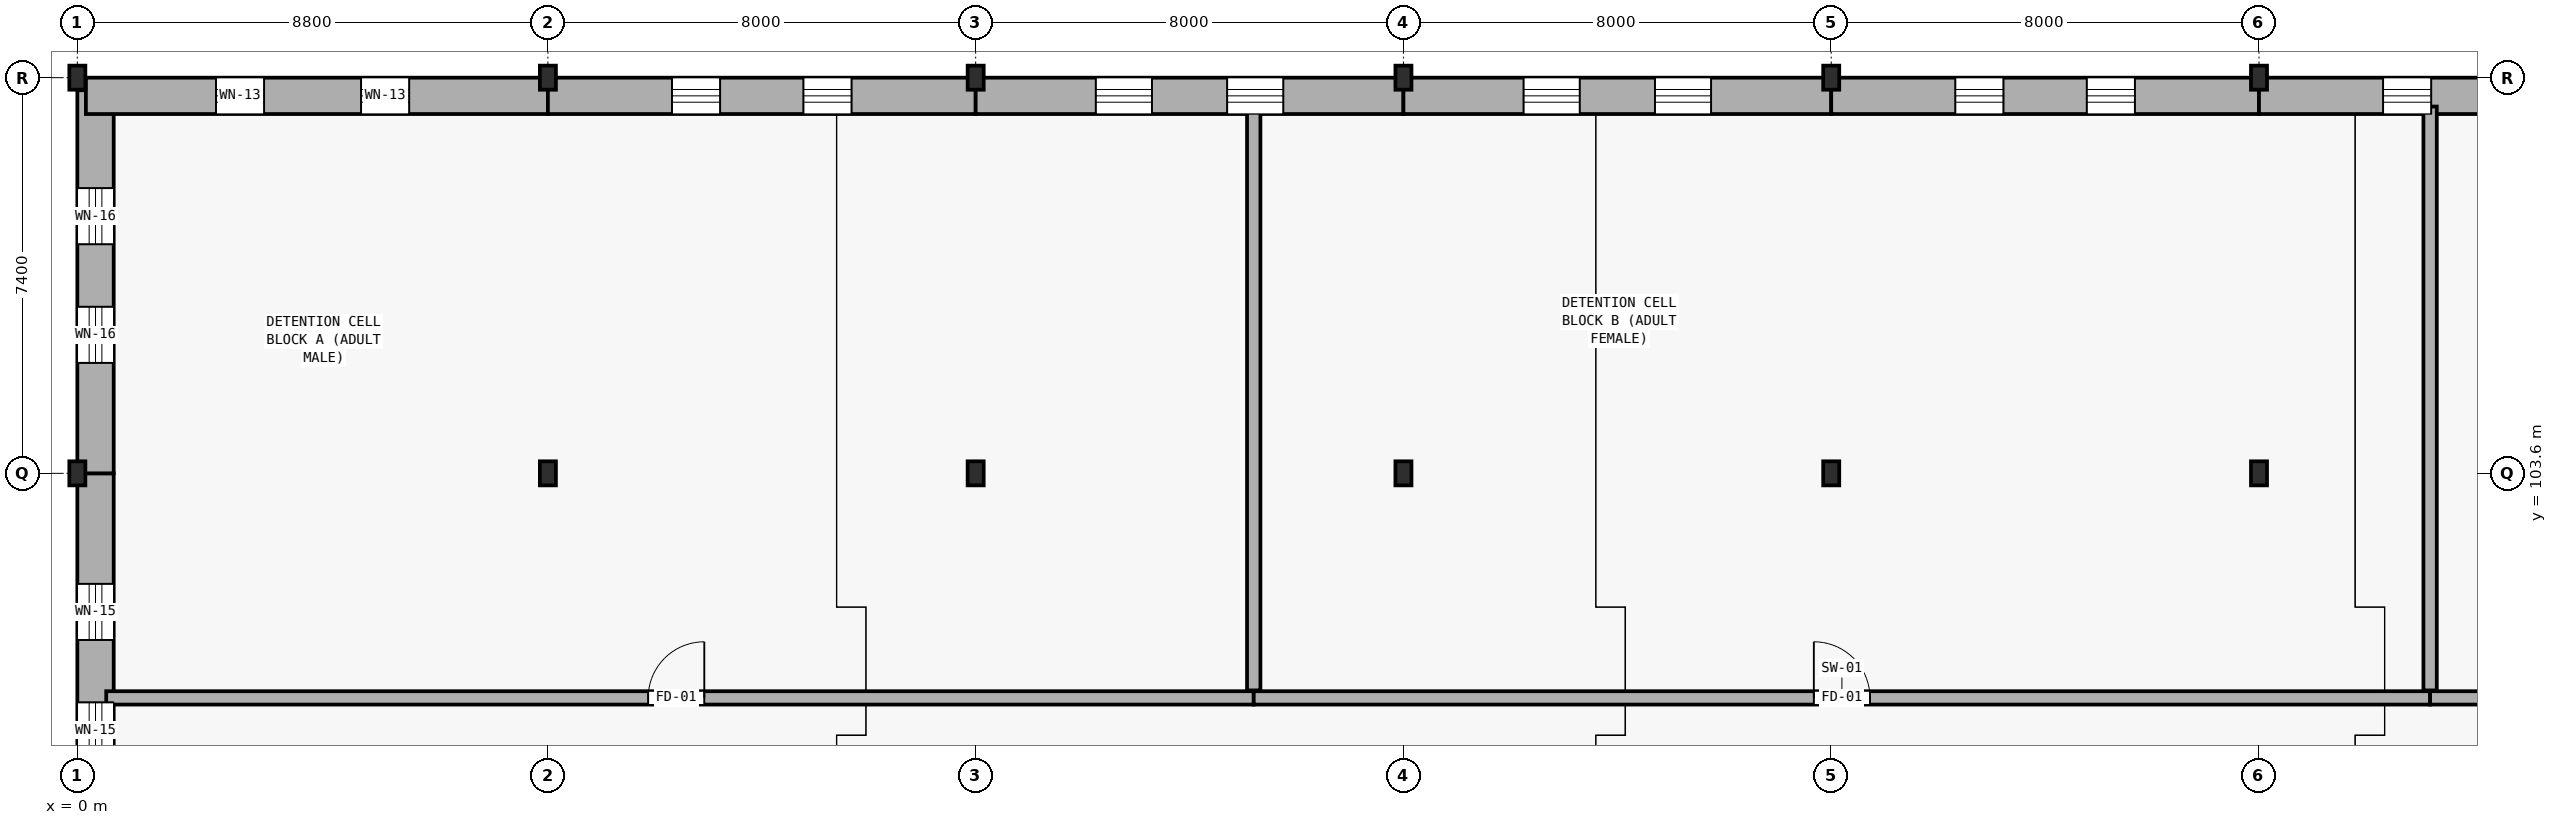
"""IFC4 building model, lengths in metres.
Left out: names, types, materials, properties, quantities, classifications, styles, units other than length and angle.
Written with IfcOpenShell. Run it as: python <this file> out.ifc"""

import sys

from ifc_helpers import new_model, si_unit, direction, frame, frame_2d, origin, origin_2d, place, context, subcontext, project, spatial, rectangle, i_section, extrude, element, fill, save


model = new_model("IFC4")
c1 = context("Model", 3, precision=1e-05, world=origin(), true_north=direction((0.0, 1.0)))
c2 = subcontext(c1, "Body", "Model", "MODEL_VIEW")
j1 = project(units=[si_unit("LENGTHUNIT", "METRE"), si_unit("PLANEANGLEUNIT", "RADIAN")], contexts=[c1])
p1 = place(None, origin())
s1 = spatial("IfcSite", under=j1, at=p1, CompositionType="ELEMENT")
p2 = place(p1, origin())
s2 = spatial("IfcBuilding", under=s1, at=p2, CompositionType="ELEMENT")
p3 = place(p2, frame((0.0, 0.0, 5.4)))
s3 = spatial("IfcBuildingStorey", under=s2, at=p3, CompositionType="ELEMENT", Elevation=5.4)
for number, where, z_axis, x_axis in (
    (1, (0.0, 103.6, 0.0), (0.0, 0.0, 1.0), (1.0, 0.0, 0.0)),
    (2, (0.0, 111.0, 0.0), (0.0, 0.0, 1.0), (1.0, 0.0, 0.0)),
    (3, (8.8, 103.6, 0.0), (0.0, 0.0, 1.0), (1.0, 0.0, 0.0)),
    (4, (8.8, 111.0, 0.0), (0.0, 0.0, 1.0), (1.0, 0.0, 0.0)),
    (5, (16.8, 103.6, 0.0), (0.0, 0.0, 1.0), (1.0, 0.0, 0.0)),
    (6, (16.8, 111.0, 0.0), (0.0, 0.0, 1.0), (1.0, 0.0, 0.0)),
    (7, (24.8, 103.6, 0.0), (0.0, 0.0, 1.0), (1.0, 0.0, 0.0)),
    (8, (24.8, 111.0, 0.0), (0.0, 0.0, 1.0), (1.0, 0.0, 0.0)),
    (9, (32.8, 103.6, 0.0), (0.0, 0.0, 1.0), (1.0, 0.0, 0.0)),
    (10, (32.8, 111.0, 0.0), (0.0, 0.0, 1.0), (1.0, 0.0, 0.0)),
    (11, (40.8, 103.6, 0.0), (0.0, 0.0, 1.0), (1.0, 0.0, 0.0)),
    (12, (40.8, 111.0, 0.0), (0.0, 0.0, 1.0), (1.0, 0.0, 0.0)),
):
    element("IfcColumn", number, at=place(p3, frame(where, z_axis=z_axis, x_axis=x_axis)), inside=s3, PredefinedType="COLUMN", context=c2, shape_type="SweptSolid", body=[
        extrude(i_section(OverallWidth=0.3, OverallDepth=0.45, WebThickness=0.014, FlangeThickness=0.026, FilletRadius=0.027, at=origin_2d()), origin(), (0.0, 0.0, 1.0), 4.5),
    ])
p4 = place(p3, frame((0.34, 96.2, 0.0), z_axis=(0.0, 0.0, 1.0), x_axis=(0.0, 1.0, 0.0)))
e13 = element("IfcWall", 13, at=p4, inside=s3, PredefinedType="SOLIDWALL", context=c2, shape_type="SweptSolid", body=[
    extrude(rectangle(XDim=7.4, YDim=0.68, at=frame_2d((3.7, 0.0))), origin(), (0.0, 0.0, 1.0), 4.22),
])
p5 = place(p4, frame((2.066, 0.0, 1.8)))
e14 = element("IfcOpeningElement", 14, at=p5, cuts=e13, PredefinedType="OPENING", context=c2, shape_type="SweptSolid", body=[
    extrude(rectangle(XDim=1.05, YDim=0.95, at=frame_2d((0.525, 0.475))), frame((0.0, 0.35, 0.0), z_axis=(0.0, -1.0, 0.0), x_axis=(1.0, 0.0, 0.0)), (0.0, 0.0, 1.0), 0.7),
])
p6 = place(p4, frame((4.284, 0.0, 1.8)))
e15 = element("IfcOpeningElement", 15, at=p6, cuts=e13, PredefinedType="OPENING", context=c2, shape_type="SweptSolid", body=[
    extrude(rectangle(XDim=1.05, YDim=0.95, at=frame_2d((0.525, 0.475))), frame((0.0, 0.35, 0.0), z_axis=(0.0, -1.0, 0.0), x_axis=(1.0, 0.0, 0.0)), (0.0, 0.0, 1.0), 0.7),
])
p7 = place(p3, frame((0.34, 103.6, 0.0), z_axis=(0.0, 0.0, 1.0), x_axis=(0.0, 1.0, 0.0)))
e16 = element("IfcWall", 16, at=p7, inside=s3, PredefinedType="SOLIDWALL", context=c2, shape_type="SweptSolid", body=[
    extrude(rectangle(XDim=7.165, YDim=0.68, at=frame_2d((3.583, 0.0))), origin(), (0.0, 0.0, 1.0), 4.22),
])
p8 = place(p7, frame((2.066, 0.0, 1.8)))
e17 = element("IfcOpeningElement", 17, at=p8, cuts=e16, PredefinedType="OPENING", context=c2, shape_type="SweptSolid", body=[
    extrude(rectangle(XDim=1.05, YDim=1.2, at=frame_2d((0.525, 0.6))), frame((0.0, 0.35, 0.0), z_axis=(0.0, -1.0, 0.0), x_axis=(1.0, 0.0, 0.0)), (0.0, 0.0, 1.0), 0.7),
])
p9 = place(p7, frame((4.284, 0.0, 1.8)))
e18 = element("IfcOpeningElement", 18, at=p9, cuts=e16, PredefinedType="OPENING", context=c2, shape_type="SweptSolid", body=[
    extrude(rectangle(XDim=1.05, YDim=1.2, at=frame_2d((0.525, 0.6))), frame((0.0, 0.35, 0.0), z_axis=(0.0, -1.0, 0.0), x_axis=(1.0, 0.0, 0.0)), (0.0, 0.0, 1.0), 0.7),
])
p10 = place(p3, frame((0.16, 110.66, 0.0), z_axis=(0.0, 0.0, 1.0), x_axis=(1.0, 0.0, 0.0)))
e19 = element("IfcWall", 19, at=p10, inside=s3, PredefinedType="SOLIDWALL", context=c2, shape_type="SweptSolid", body=[
    extrude(rectangle(XDim=8.64, YDim=0.68, at=frame_2d((4.32, 0.0))), origin(), (0.0, 0.0, 1.0), 4.22),
])
p11 = place(p10, frame((2.433, 0.0, 1.8)))
e20 = element("IfcOpeningElement", 20, at=p11, cuts=e19, PredefinedType="OPENING", context=c2, shape_type="SweptSolid", body=[
    extrude(rectangle(XDim=0.9, YDim=0.9, at=frame_2d((0.45, 0.45))), frame((0.0, 0.35, 0.0), z_axis=(0.0, -1.0, 0.0), x_axis=(1.0, 0.0, 0.0)), (0.0, 0.0, 1.0), 0.7),
])
p12 = place(p10, frame((5.147, 0.0, 1.8)))
e21 = element("IfcOpeningElement", 21, at=p12, cuts=e19, PredefinedType="OPENING", context=c2, shape_type="SweptSolid", body=[
    extrude(rectangle(XDim=0.9, YDim=0.9, at=frame_2d((0.45, 0.45))), frame((0.0, 0.35, 0.0), z_axis=(0.0, -1.0, 0.0), x_axis=(1.0, 0.0, 0.0)), (0.0, 0.0, 1.0), 0.7),
])
p13 = place(p3, frame((8.8, 110.66, 0.0), z_axis=(0.0, 0.0, 1.0), x_axis=(1.0, 0.0, 0.0)))
e22 = element("IfcWall", 22, at=p13, inside=s3, PredefinedType="SOLIDWALL", context=c2, shape_type="SweptSolid", body=[
    extrude(rectangle(XDim=8.0, YDim=0.68, at=frame_2d((4.0, 0.0))), origin(), (0.0, 0.0, 1.0), 4.22),
])
p14 = place(p13, frame((2.321, 0.0, 1.8)))
e23 = element("IfcOpeningElement", 23, at=p14, cuts=e22, PredefinedType="OPENING", context=c2, shape_type="SweptSolid", body=[
    extrude(rectangle(XDim=0.9, YDim=1.15, at=frame_2d((0.45, 0.575))), frame((0.0, 0.35, 0.0), z_axis=(0.0, -1.0, 0.0), x_axis=(1.0, 0.0, 0.0)), (0.0, 0.0, 1.0), 0.7),
])
p15 = place(p13, frame((4.779, 0.0, 1.8)))
e24 = element("IfcOpeningElement", 24, at=p15, cuts=e22, PredefinedType="OPENING", context=c2, shape_type="SweptSolid", body=[
    extrude(rectangle(XDim=0.9, YDim=1.15, at=frame_2d((0.45, 0.575))), frame((0.0, 0.35, 0.0), z_axis=(0.0, -1.0, 0.0), x_axis=(1.0, 0.0, 0.0)), (0.0, 0.0, 1.0), 0.7),
])
p16 = place(p3, frame((16.8, 110.66, 0.0), z_axis=(0.0, 0.0, 1.0), x_axis=(1.0, 0.0, 0.0)))
e25 = element("IfcWall", 25, at=p16, inside=s3, PredefinedType="SOLIDWALL", context=c2, shape_type="SweptSolid", body=[
    extrude(rectangle(XDim=8.0, YDim=0.68, at=frame_2d((4.0, 0.0))), origin(), (0.0, 0.0, 1.0), 4.22),
])
p17 = place(p16, frame((2.246, 0.0, 1.8)))
e26 = element("IfcOpeningElement", 26, at=p17, cuts=e25, PredefinedType="OPENING", context=c2, shape_type="SweptSolid", body=[
    extrude(rectangle(XDim=1.05, YDim=0.95, at=frame_2d((0.525, 0.475))), frame((0.0, 0.35, 0.0), z_axis=(0.0, -1.0, 0.0), x_axis=(1.0, 0.0, 0.0)), (0.0, 0.0, 1.0), 0.7),
])
p18 = place(p16, frame((4.704, 0.0, 1.8)))
e27 = element("IfcOpeningElement", 27, at=p18, cuts=e25, PredefinedType="OPENING", context=c2, shape_type="SweptSolid", body=[
    extrude(rectangle(XDim=1.05, YDim=0.95, at=frame_2d((0.525, 0.475))), frame((0.0, 0.35, 0.0), z_axis=(0.0, -1.0, 0.0), x_axis=(1.0, 0.0, 0.0)), (0.0, 0.0, 1.0), 0.7),
])
p19 = place(p3, frame((24.8, 110.66, 0.0), z_axis=(0.0, 0.0, 1.0), x_axis=(1.0, 0.0, 0.0)))
e28 = element("IfcWall", 28, at=p19, inside=s3, PredefinedType="SOLIDWALL", context=c2, shape_type="SweptSolid", body=[
    extrude(rectangle(XDim=8.0, YDim=0.68, at=frame_2d((4.0, 0.0))), origin(), (0.0, 0.0, 1.0), 4.22),
])
p20 = place(p19, frame((2.246, 0.0, 1.8)))
e29 = element("IfcOpeningElement", 29, at=p20, cuts=e28, PredefinedType="OPENING", context=c2, shape_type="SweptSolid", body=[
    extrude(rectangle(XDim=1.05, YDim=1.2, at=frame_2d((0.525, 0.6))), frame((0.0, 0.35, 0.0), z_axis=(0.0, -1.0, 0.0), x_axis=(1.0, 0.0, 0.0)), (0.0, 0.0, 1.0), 0.7),
])
p21 = place(p19, frame((4.704, 0.0, 1.8)))
e30 = element("IfcOpeningElement", 30, at=p21, cuts=e28, PredefinedType="OPENING", context=c2, shape_type="SweptSolid", body=[
    extrude(rectangle(XDim=1.05, YDim=1.2, at=frame_2d((0.525, 0.6))), frame((0.0, 0.35, 0.0), z_axis=(0.0, -1.0, 0.0), x_axis=(1.0, 0.0, 0.0)), (0.0, 0.0, 1.0), 0.7),
])
p22 = place(p3, frame((32.8, 110.66, 0.0), z_axis=(0.0, 0.0, 1.0), x_axis=(1.0, 0.0, 0.0)))
e31 = element("IfcWall", 31, at=p22, inside=s3, PredefinedType="SOLIDWALL", context=c2, shape_type="SweptSolid", body=[
    extrude(rectangle(XDim=8.0, YDim=0.68, at=frame_2d((4.0, 0.0))), origin(), (0.0, 0.0, 1.0), 4.22),
])
p23 = place(p22, frame((2.321, 0.0, 1.8)))
e32 = element("IfcOpeningElement", 32, at=p23, cuts=e31, PredefinedType="OPENING", context=c2, shape_type="SweptSolid", body=[
    extrude(rectangle(XDim=0.9, YDim=0.9, at=frame_2d((0.45, 0.45))), frame((0.0, 0.35, 0.0), z_axis=(0.0, -1.0, 0.0), x_axis=(1.0, 0.0, 0.0)), (0.0, 0.0, 1.0), 0.7),
])
p24 = place(p22, frame((4.779, 0.0, 1.8)))
e33 = element("IfcOpeningElement", 33, at=p24, cuts=e31, PredefinedType="OPENING", context=c2, shape_type="SweptSolid", body=[
    extrude(rectangle(XDim=0.9, YDim=0.9, at=frame_2d((0.45, 0.45))), frame((0.0, 0.35, 0.0), z_axis=(0.0, -1.0, 0.0), x_axis=(1.0, 0.0, 0.0)), (0.0, 0.0, 1.0), 0.7),
])
p25 = place(p3, frame((40.8, 110.66, 0.0), z_axis=(0.0, 0.0, 1.0), x_axis=(1.0, 0.0, 0.0)))
e34 = element("IfcWall", 34, at=p25, inside=s3, PredefinedType="SOLIDWALL", context=c2, shape_type="SweptSolid", body=[
    extrude(rectangle(XDim=8.0, YDim=0.68, at=frame_2d((4.0, 0.0))), origin(), (0.0, 0.0, 1.0), 4.22),
])
p26 = place(p25, frame((2.321, 0.0, 1.8)))
e35 = element("IfcOpeningElement", 35, at=p26, cuts=e34, PredefinedType="OPENING", context=c2, shape_type="SweptSolid", body=[
    extrude(rectangle(XDim=0.9, YDim=1.15, at=frame_2d((0.45, 0.575))), frame((0.0, 0.35, 0.0), z_axis=(0.0, -1.0, 0.0), x_axis=(1.0, 0.0, 0.0)), (0.0, 0.0, 1.0), 0.7),
])
p27 = place(p25, frame((4.779, 0.0, 1.8)))
e36 = element("IfcOpeningElement", 36, at=p27, cuts=e34, PredefinedType="OPENING", context=c2, shape_type="SweptSolid", body=[
    extrude(rectangle(XDim=0.9, YDim=1.15, at=frame_2d((0.45, 0.575))), frame((0.0, 0.35, 0.0), z_axis=(0.0, -1.0, 0.0), x_axis=(1.0, 0.0, 0.0)), (0.0, 0.0, 1.0), 0.7),
])
p28 = place(p3, frame((0.54, 99.4, 0.0), z_axis=(0.0, 0.0, 1.0), x_axis=(1.0, 0.0, 0.0)))
e37 = element("IfcWall", 37, at=p28, inside=s3, PredefinedType="SOLIDWALL", context=c2, shape_type="SweptSolid", body=[
    extrude(rectangle(XDim=21.46, YDim=0.25, at=frame_2d((10.73, 0.0))), origin(), (0.0, 0.0, 1.0), 3.71),
])
p29 = place(p28, frame((10.135, 0.0, 0.0)))
e38 = element("IfcOpeningElement", 38, at=p29, cuts=e37, PredefinedType="OPENING", context=c2, shape_type="SweptSolid", body=[
    extrude(rectangle(XDim=1.05, YDim=2.15, at=frame_2d((0.525, 1.075))), frame((0.0, 0.135, 0.0), z_axis=(0.0, -1.0, 0.0), x_axis=(1.0, 0.0, 0.0)), (0.0, 0.0, 1.0), 0.27),
])
p30 = place(p3, frame((22.0, 99.54, 0.0), z_axis=(0.0, 0.0, 1.0), x_axis=(0.0, 1.0, 0.0)))
e39 = element("IfcWall", 39, at=p30, inside=s3, PredefinedType="SOLIDWALL", context=c2, shape_type="SweptSolid", body=[
    extrude(rectangle(XDim=10.92, YDim=0.25, at=frame_2d((5.46, 0.0))), origin(), (0.0, 0.0, 1.0), 3.65),
])
p31 = place(p3, frame((22.0, 99.4, 0.0), z_axis=(0.0, 0.0, 1.0), x_axis=(1.0, 0.0, 0.0)))
e40 = element("IfcWall", 40, at=p31, inside=s3, PredefinedType="SOLIDWALL", context=c2, shape_type="SweptSolid", body=[
    extrude(rectangle(XDim=22.0, YDim=0.25, at=frame_2d((11.0, 0.0))), origin(), (0.0, 0.0, 1.0), 3.71),
])
p32 = place(p31, frame((10.475, 0.0, 0.0)))
e41 = element("IfcOpeningElement", 41, at=p32, cuts=e40, PredefinedType="OPENING", context=c2, shape_type="SweptSolid", body=[
    extrude(rectangle(XDim=1.05, YDim=2.15, at=frame_2d((0.525, 1.075))), frame((0.0, 0.135, 0.0), z_axis=(0.0, -1.0, 0.0), x_axis=(1.0, 0.0, 0.0)), (0.0, 0.0, 1.0), 0.27),
])
p33 = place(p3, frame((44.0, 99.54, 0.0), z_axis=(0.0, 0.0, 1.0), x_axis=(0.0, 1.0, 0.0)))
e42 = element("IfcWall", 42, at=p33, inside=s3, PredefinedType="SOLIDWALL", context=c2, shape_type="SweptSolid", body=[
    extrude(rectangle(XDim=10.92, YDim=0.25, at=frame_2d((5.46, 0.0))), origin(), (0.0, 0.0, 1.0), 3.65),
])
p34 = place(p3, frame((44.0, 99.4, 0.0), z_axis=(0.0, 0.0, 1.0), x_axis=(1.0, 0.0, 0.0)))
e43 = element("IfcWall", 43, at=p34, inside=s3, PredefinedType="SOLIDWALL", context=c2, shape_type="SweptSolid", body=[
    extrude(rectangle(XDim=12.26, YDim=0.25, at=frame_2d((6.13, 0.0))), origin(), (0.0, 0.0, 1.0), 3.71),
])
p35 = place(p34, frame((5.625, 0.0, 0.0)))
e44 = element("IfcOpeningElement", 44, at=p35, cuts=e43, PredefinedType="OPENING", context=c2, shape_type="SweptSolid", body=[
    extrude(rectangle(XDim=1.15, YDim=2.15, at=frame_2d((0.575, 1.075))), frame((0.0, 0.135, 0.0), z_axis=(0.0, -1.0, 0.0), x_axis=(1.0, 0.0, 0.0)), (0.0, 0.0, 1.0), 0.27),
])
p36 = place(p5, origin())
e45 = element("IfcWindow", 45, at=p36, inside=s3, PartitioningType="SINGLE_PANEL", PredefinedType="WINDOW", context=c2, shape_type="SweptSolid", body=[
    extrude(rectangle(XDim=1.05, YDim=0.95, at=frame_2d((0.525, 0.475))), frame((0.0, 0.03, 0.0), z_axis=(0.0, -1.0, 0.0), x_axis=(1.0, 0.0, 0.0)), (0.0, 0.0, 1.0), 0.06),
])
fill(e14, e45)
p37 = place(p6, origin())
e46 = element("IfcWindow", 46, at=p37, inside=s3, PartitioningType="SINGLE_PANEL", PredefinedType="WINDOW", context=c2, shape_type="SweptSolid", body=[
    extrude(rectangle(XDim=1.05, YDim=0.95, at=frame_2d((0.525, 0.475))), frame((0.0, 0.03, 0.0), z_axis=(0.0, -1.0, 0.0), x_axis=(1.0, 0.0, 0.0)), (0.0, 0.0, 1.0), 0.06),
])
fill(e15, e46)
p38 = place(p8, origin())
e47 = element("IfcWindow", 47, at=p38, inside=s3, PartitioningType="SINGLE_PANEL", PredefinedType="WINDOW", context=c2, shape_type="SweptSolid", body=[
    extrude(rectangle(XDim=1.05, YDim=1.2, at=frame_2d((0.525, 0.6))), frame((0.0, 0.03, 0.0), z_axis=(0.0, -1.0, 0.0), x_axis=(1.0, 0.0, 0.0)), (0.0, 0.0, 1.0), 0.06),
])
fill(e17, e47)
p39 = place(p9, origin())
e48 = element("IfcWindow", 48, at=p39, inside=s3, PartitioningType="SINGLE_PANEL", PredefinedType="WINDOW", context=c2, shape_type="SweptSolid", body=[
    extrude(rectangle(XDim=1.05, YDim=1.2, at=frame_2d((0.525, 0.6))), frame((0.0, 0.03, 0.0), z_axis=(0.0, -1.0, 0.0), x_axis=(1.0, 0.0, 0.0)), (0.0, 0.0, 1.0), 0.06),
])
fill(e18, e48)
p40 = place(p11, origin())
e49 = element("IfcWindow", 49, at=p40, inside=s3, PartitioningType="SINGLE_PANEL", PredefinedType="WINDOW", context=c2, shape_type="SweptSolid", body=[
    extrude(rectangle(XDim=0.9, YDim=0.9, at=frame_2d((0.45, 0.45))), frame((0.0, 0.03, 0.0), z_axis=(0.0, -1.0, 0.0), x_axis=(1.0, 0.0, 0.0)), (0.0, 0.0, 1.0), 0.06),
])
fill(e20, e49)
p41 = place(p12, origin())
e50 = element("IfcWindow", 50, at=p41, inside=s3, PartitioningType="SINGLE_PANEL", PredefinedType="WINDOW", context=c2, shape_type="SweptSolid", body=[
    extrude(rectangle(XDim=0.9, YDim=0.9, at=frame_2d((0.45, 0.45))), frame((0.0, 0.03, 0.0), z_axis=(0.0, -1.0, 0.0), x_axis=(1.0, 0.0, 0.0)), (0.0, 0.0, 1.0), 0.06),
])
fill(e21, e50)
p42 = place(p14, origin())
e51 = element("IfcWindow", 51, at=p42, inside=s3, PartitioningType="SINGLE_PANEL", PredefinedType="WINDOW", context=c2, shape_type="SweptSolid", body=[
    extrude(rectangle(XDim=0.9, YDim=1.15, at=frame_2d((0.45, 0.575))), frame((0.0, 0.03, 0.0), z_axis=(0.0, -1.0, 0.0), x_axis=(1.0, 0.0, 0.0)), (0.0, 0.0, 1.0), 0.06),
])
fill(e23, e51)
p43 = place(p15, origin())
e52 = element("IfcWindow", 52, at=p43, inside=s3, PartitioningType="SINGLE_PANEL", PredefinedType="WINDOW", context=c2, shape_type="SweptSolid", body=[
    extrude(rectangle(XDim=0.9, YDim=1.15, at=frame_2d((0.45, 0.575))), frame((0.0, 0.03, 0.0), z_axis=(0.0, -1.0, 0.0), x_axis=(1.0, 0.0, 0.0)), (0.0, 0.0, 1.0), 0.06),
])
fill(e24, e52)
p44 = place(p17, origin())
e53 = element("IfcWindow", 53, at=p44, inside=s3, PartitioningType="SINGLE_PANEL", PredefinedType="WINDOW", context=c2, shape_type="SweptSolid", body=[
    extrude(rectangle(XDim=1.05, YDim=0.95, at=frame_2d((0.525, 0.475))), frame((0.0, 0.03, 0.0), z_axis=(0.0, -1.0, 0.0), x_axis=(1.0, 0.0, 0.0)), (0.0, 0.0, 1.0), 0.06),
])
fill(e26, e53)
p45 = place(p18, origin())
e54 = element("IfcWindow", 54, at=p45, inside=s3, PartitioningType="SINGLE_PANEL", PredefinedType="WINDOW", context=c2, shape_type="SweptSolid", body=[
    extrude(rectangle(XDim=1.05, YDim=0.95, at=frame_2d((0.525, 0.475))), frame((0.0, 0.03, 0.0), z_axis=(0.0, -1.0, 0.0), x_axis=(1.0, 0.0, 0.0)), (0.0, 0.0, 1.0), 0.06),
])
fill(e27, e54)
p46 = place(p20, origin())
e55 = element("IfcWindow", 55, at=p46, inside=s3, PartitioningType="SINGLE_PANEL", PredefinedType="WINDOW", context=c2, shape_type="SweptSolid", body=[
    extrude(rectangle(XDim=1.05, YDim=1.2, at=frame_2d((0.525, 0.6))), frame((0.0, 0.03, 0.0), z_axis=(0.0, -1.0, 0.0), x_axis=(1.0, 0.0, 0.0)), (0.0, 0.0, 1.0), 0.06),
])
fill(e29, e55)
p47 = place(p21, origin())
e56 = element("IfcWindow", 56, at=p47, inside=s3, PartitioningType="SINGLE_PANEL", PredefinedType="WINDOW", context=c2, shape_type="SweptSolid", body=[
    extrude(rectangle(XDim=1.05, YDim=1.2, at=frame_2d((0.525, 0.6))), frame((0.0, 0.03, 0.0), z_axis=(0.0, -1.0, 0.0), x_axis=(1.0, 0.0, 0.0)), (0.0, 0.0, 1.0), 0.06),
])
fill(e30, e56)
p48 = place(p23, origin())
e57 = element("IfcWindow", 57, at=p48, inside=s3, PartitioningType="SINGLE_PANEL", PredefinedType="WINDOW", context=c2, shape_type="SweptSolid", body=[
    extrude(rectangle(XDim=0.9, YDim=0.9, at=frame_2d((0.45, 0.45))), frame((0.0, 0.03, 0.0), z_axis=(0.0, -1.0, 0.0), x_axis=(1.0, 0.0, 0.0)), (0.0, 0.0, 1.0), 0.06),
])
fill(e32, e57)
p49 = place(p24, origin())
e58 = element("IfcWindow", 58, at=p49, inside=s3, PartitioningType="SINGLE_PANEL", PredefinedType="WINDOW", context=c2, shape_type="SweptSolid", body=[
    extrude(rectangle(XDim=0.9, YDim=0.9, at=frame_2d((0.45, 0.45))), frame((0.0, 0.03, 0.0), z_axis=(0.0, -1.0, 0.0), x_axis=(1.0, 0.0, 0.0)), (0.0, 0.0, 1.0), 0.06),
])
fill(e33, e58)
p50 = place(p26, origin())
e59 = element("IfcWindow", 59, at=p50, inside=s3, PartitioningType="SINGLE_PANEL", PredefinedType="WINDOW", context=c2, shape_type="SweptSolid", body=[
    extrude(rectangle(XDim=0.9, YDim=1.15, at=frame_2d((0.45, 0.575))), frame((0.0, 0.03, 0.0), z_axis=(0.0, -1.0, 0.0), x_axis=(1.0, 0.0, 0.0)), (0.0, 0.0, 1.0), 0.06),
])
fill(e35, e59)
p51 = place(p29, origin())
e60 = element("IfcDoor", 60, at=p51, inside=s3, OperationType="SINGLE_SWING_RIGHT", PredefinedType="DOOR", context=c2, shape_type="SweptSolid", body=[
    extrude(rectangle(XDim=1.05, YDim=2.15, at=frame_2d((0.525, 1.075))), frame((0.0, 0.025, 0.0), z_axis=(0.0, -1.0, 0.0), x_axis=(1.0, 0.0, 0.0)), (0.0, 0.0, 1.0), 0.05),
])
fill(e38, e60)
p52 = place(p32, origin())
e61 = element("IfcDoor", 61, at=p52, inside=s3, OperationType="SINGLE_SWING_LEFT", PredefinedType="DOOR", context=c2, shape_type="SweptSolid", body=[
    extrude(rectangle(XDim=1.05, YDim=2.15, at=frame_2d((0.525, 1.075))), frame((0.0, 0.025, 0.0), z_axis=(0.0, -1.0, 0.0), x_axis=(1.0, 0.0, 0.0)), (0.0, 0.0, 1.0), 0.05),
])
fill(e41, e61)
save(model, sys.argv[1])
